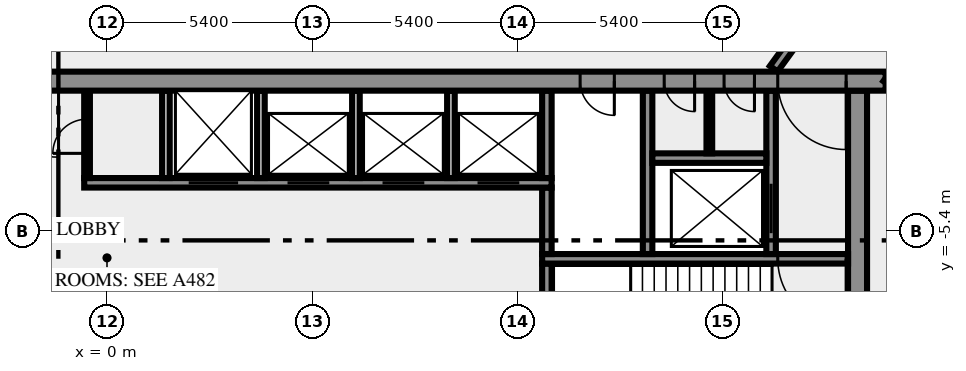
"""IFC4 building model, lengths in metres.
Left out: names, types, materials, properties, quantities, classifications, styles, units other than length and angle.
Written with IfcOpenShell. Run it as: python <this file> out.ifc"""

import sys

from ifc_helpers import new_model, si_unit, direction, frame, frame_2d, origin, place, context, subcontext, project, spatial, rectangle, extrude, element, fill, save


model = new_model("IFC4")
c1 = context("Model", 3, precision=1e-05, world=origin(), true_north=direction((0.0, 1.0)))
c2 = subcontext(c1, "Body", "Model", "MODEL_VIEW")
j1 = project(units=[si_unit("LENGTHUNIT", "METRE"), si_unit("PLANEANGLEUNIT", "RADIAN")], contexts=[c1])
p1 = place(None, origin())
s1 = spatial("IfcSite", under=j1, at=p1, CompositionType="ELEMENT")
p2 = place(p1, origin())
s2 = spatial("IfcBuilding", under=s1, at=p2, CompositionType="ELEMENT")
p3 = place(p2, frame((0.0, 0.0, 160.0)))
s3 = spatial("IfcBuildingStorey", under=s2, at=p3, CompositionType="ELEMENT", Elevation=160.0)
p4 = place(p3, frame((19.75, -10.5, 0.0), z_axis=(0.0, 0.0, 1.0), x_axis=(0.0, 1.0, 0.0)))
e1 = element("IfcWall", 1, at=p4, inside=s3, PredefinedType="SHEAR", context=c2, shape_type="SweptSolid", body=[
    extrude(rectangle(XDim=8.8, YDim=0.5, at=frame_2d((4.4, 0.0))), origin(), (0.0, 0.0, 1.0), 3.65),
])
p5 = place(p3, frame((11.575, -7.25, 0.0), z_axis=(0.0, 0.0, 1.0), x_axis=(0.0, 1.0, 0.0)))
e2 = element("IfcWall", 2, at=p5, inside=s3, PredefinedType="SHEAR", context=c2, shape_type="SweptSolid", body=[
    extrude(rectangle(XDim=1.0, YDim=0.25, at=frame_2d((0.5, 0.0))), origin(), (0.0, 0.0, 1.0), 3.65),
])
p6 = place(p3, frame((19.5, -6.125, 0.0), z_axis=(0.0, 0.0, 1.0), x_axis=(-1.0, 0.0, 0.0)))
e3 = element("IfcWall", 3, at=p6, inside=s3, PredefinedType="SHEAR", context=c2, shape_type="SweptSolid", body=[
    extrude(rectangle(XDim=8.05, YDim=0.25, at=frame_2d((4.025, 0.0))), origin(), (0.0, 0.0, 1.0), 3.65),
])
p7 = place(p6, frame((0.05, 0.0, 0.0)))
e4 = element("IfcOpeningElement", 4, at=p7, cuts=e3, PredefinedType="OPENING", context=c2, shape_type="SweptSolid", body=[
    extrude(rectangle(XDim=1.8, YDim=2.1, at=frame_2d((0.9, 1.05))), frame((0.0, 0.135, 0.0), z_axis=(0.0, -1.0, 0.0), x_axis=(1.0, 0.0, 0.0)), (0.0, 0.0, 1.0), 0.27),
])
p8 = place(p3, frame((11.575, -6.0, 0.0), z_axis=(0.0, 0.0, 1.0), x_axis=(0.0, 1.0, 0.0)))
e5 = element("IfcWall", 5, at=p8, inside=s3, PredefinedType="SHEAR", context=c2, shape_type="SweptSolid", body=[
    extrude(rectangle(XDim=1.75, YDim=0.25, at=frame_2d((0.875, 0.0))), origin(), (0.0, 0.0, 1.0), 3.65),
])
p9 = place(p3, frame((14.225, -6.0, 0.0), z_axis=(0.0, 0.0, 1.0), x_axis=(0.0, 1.0, 0.0)))
e6 = element("IfcWall", 6, at=p9, inside=s3, PredefinedType="SHEAR", context=c2, shape_type="SweptSolid", body=[
    extrude(rectangle(XDim=4.3, YDim=0.25, at=frame_2d((2.15, 0.0))), origin(), (0.0, 0.0, 1.0), 3.65),
])
p10 = place(p3, frame((17.475, -6.0, 0.0), z_axis=(0.0, 0.0, 1.0), x_axis=(0.0, 1.0, 0.0)))
e7 = element("IfcWall", 7, at=p10, inside=s3, PredefinedType="SHEAR", context=c2, shape_type="SweptSolid", body=[
    extrude(rectangle(XDim=4.3, YDim=0.25, at=frame_2d((2.15, 0.0))), origin(), (0.0, 0.0, 1.0), 3.65),
])
p11 = place(p10, frame((0.55, 0.0, 0.0)))
e8 = element("IfcOpeningElement", 8, at=p11, cuts=e7, PredefinedType="OPENING", context=c2, shape_type="SweptSolid", body=[
    extrude(rectangle(XDim=1.3, YDim=2.1, at=frame_2d((0.65, 1.05))), frame((0.0, 0.135, 0.0), z_axis=(0.0, -1.0, 0.0), x_axis=(1.0, 0.0, 0.0)), (0.0, 0.0, 1.0), 0.27),
])
p12 = place(p3, frame((-0.6, -4.125, 0.0), z_axis=(0.0, 0.0, 1.0), x_axis=(1.0, 0.0, 0.0)))
e9 = element("IfcWall", 9, at=p12, inside=s3, PredefinedType="SHEAR", context=c2, shape_type="SweptSolid", body=[
    extrude(rectangle(XDim=12.3, YDim=0.25, at=frame_2d((6.15, 0.0))), origin(), (0.0, 0.0, 1.0), 3.65),
])
p13 = place(p12, frame((2.75, 0.0, 0.0)))
e10 = element("IfcOpeningElement", 10, at=p13, cuts=e9, PredefinedType="OPENING", context=c2, shape_type="SweptSolid", body=[
    extrude(rectangle(XDim=1.3, YDim=2.1, at=frame_2d((0.65, 1.05))), frame((0.0, 0.135, 0.0), z_axis=(0.0, -1.0, 0.0), x_axis=(1.0, 0.0, 0.0)), (0.0, 0.0, 1.0), 0.27),
])
p14 = place(p12, frame((5.35, 0.0, 0.0)))
e11 = element("IfcOpeningElement", 11, at=p14, cuts=e9, PredefinedType="OPENING", context=c2, shape_type="SweptSolid", body=[
    extrude(rectangle(XDim=1.1, YDim=2.1, at=frame_2d((0.55, 1.05))), frame((0.0, 0.135, 0.0), z_axis=(0.0, -1.0, 0.0), x_axis=(1.0, 0.0, 0.0)), (0.0, 0.0, 1.0), 0.27),
])
p15 = place(p12, frame((7.85, 0.0, 0.0)))
e12 = element("IfcOpeningElement", 12, at=p15, cuts=e9, PredefinedType="OPENING", context=c2, shape_type="SweptSolid", body=[
    extrude(rectangle(XDim=1.1, YDim=2.1, at=frame_2d((0.55, 1.05))), frame((0.0, 0.135, 0.0), z_axis=(0.0, -1.0, 0.0), x_axis=(1.0, 0.0, 0.0)), (0.0, 0.0, 1.0), 0.27),
])
p16 = place(p12, frame((10.35, 0.0, 0.0)))
e13 = element("IfcOpeningElement", 13, at=p16, cuts=e9, PredefinedType="OPENING", context=c2, shape_type="SweptSolid", body=[
    extrude(rectangle(XDim=1.1, YDim=2.1, at=frame_2d((0.55, 1.05))), frame((0.0, 0.135, 0.0), z_axis=(0.0, -1.0, 0.0), x_axis=(1.0, 0.0, 0.0)), (0.0, 0.0, 1.0), 0.27),
])
p17 = place(p3, frame((-0.525, -4.0, 0.0), z_axis=(0.0, 0.0, 1.0), x_axis=(0.0, 1.0, 0.0)))
e14 = element("IfcWall", 14, at=p17, inside=s3, PredefinedType="PARTITIONING", context=c2, shape_type="SweptSolid", body=[
    extrude(rectangle(XDim=2.3, YDim=0.15, at=frame_2d((1.15, 0.0))), origin(), (0.0, 0.0, 1.0), 3.65),
])
p18 = place(p17, frame((0.65, 0.0, 0.0)))
e15 = element("IfcOpeningElement", 15, at=p18, cuts=e14, PredefinedType="OPENING", context=c2, shape_type="SweptSolid", body=[
    extrude(rectangle(XDim=0.9, YDim=2.1, at=frame_2d((0.45, 1.05))), frame((0.0, 0.085, 0.0), z_axis=(0.0, -1.0, 0.0), x_axis=(1.0, 0.0, 0.0)), (0.0, 0.0, 1.0), 0.17),
])
for number, where, z_axis, x_axis in (
    (16, (1.55, -4.0, 0.0), (0.0, 0.0, 1.0), (0.0, 1.0, 0.0)),
    (17, (4.05, -4.0, 0.0), (0.0, 0.0, 1.0), (0.0, 1.0, 0.0)),
    (18, (6.55, -4.0, 0.0), (0.0, 0.0, 1.0), (0.0, 1.0, 0.0)),
    (19, (9.05, -4.0, 0.0), (0.0, 0.0, 1.0), (0.0, 1.0, 0.0)),
):
    element("IfcWall", number, at=place(p3, frame(where, z_axis=z_axis, x_axis=x_axis)), inside=s3, PredefinedType="SOLIDWALL", context=c2, shape_type="SweptSolid", body=[
        extrude(rectangle(XDim=2.3, YDim=0.2, at=frame_2d((1.15, 0.0))), origin(), (0.0, 0.0, 1.0), 3.65),
    ])
p19 = place(p3, frame((11.575, -4.0, 0.0), z_axis=(0.0, 0.0, 1.0), x_axis=(0.0, 1.0, 0.0)))
e20 = element("IfcWall", 20, at=p19, inside=s3, PredefinedType="SHEAR", context=c2, shape_type="SweptSolid", body=[
    extrude(rectangle(XDim=2.3, YDim=0.25, at=frame_2d((1.15, 0.0))), origin(), (0.0, 0.0, 1.0), 3.65),
])
p20 = place(p3, frame((14.35, -3.475, 0.0), z_axis=(0.0, 0.0, 1.0), x_axis=(1.0, 0.0, 0.0)))
e21 = element("IfcWall", 21, at=p20, inside=s3, PredefinedType="SHEAR", context=c2, shape_type="SweptSolid", body=[
    extrude(rectangle(XDim=3.0, YDim=0.25, at=frame_2d((1.5, 0.0))), origin(), (0.0, 0.0, 1.0), 3.65),
])
p21 = place(p3, frame((15.85, -3.35, 0.0), z_axis=(0.0, 0.0, 1.0), x_axis=(0.0, 1.0, 0.0)))
e22 = element("IfcWall", 22, at=p21, inside=s3, PredefinedType="PARTITIONING", context=c2, shape_type="SweptSolid", body=[
    extrude(rectangle(XDim=1.65, YDim=0.15, at=frame_2d((0.825, 0.0))), origin(), (0.0, 0.0, 1.0), 3.65),
])
p22 = place(p3, frame((20.49, -1.45, 0.0), z_axis=(0.0, 0.0, 1.0), x_axis=(-1.0, 0.0, 0.0)))
e23 = element("IfcWall", 23, at=p22, inside=s3, PredefinedType="SHEAR", context=c2, shape_type="SweptSolid", body=[
    extrude(rectangle(XDim=40.98, YDim=0.5, at=frame_2d((20.49, 0.0))), origin(), (0.0, 0.0, 1.0), 3.65),
])
p23 = place(p22, frame((38.14, 0.0, 0.0)))
e24 = element("IfcOpeningElement", 24, at=p23, cuts=e23, PredefinedType="OPENING", context=c2, shape_type="SweptSolid", body=[
    extrude(rectangle(XDim=1.8, YDim=2.1, at=frame_2d((0.9, 1.05))), frame((0.0, 0.26, 0.0), z_axis=(0.0, -1.0, 0.0), x_axis=(1.0, 0.0, 0.0)), (0.0, 0.0, 1.0), 0.52),
])
p24 = place(p22, frame((35.89, 0.0, 0.0)))
e25 = element("IfcOpeningElement", 25, at=p24, cuts=e23, PredefinedType="OPENING", context=c2, shape_type="SweptSolid", body=[
    extrude(rectangle(XDim=0.9, YDim=2.1, at=frame_2d((0.45, 1.05))), frame((0.0, 0.26, 0.0), z_axis=(0.0, -1.0, 0.0), x_axis=(1.0, 0.0, 0.0)), (0.0, 0.0, 1.0), 0.52),
])
p25 = place(p22, frame((32.94, 0.0, 0.0)))
e26 = element("IfcOpeningElement", 26, at=p25, cuts=e23, PredefinedType="OPENING", context=c2, shape_type="SweptSolid", body=[
    extrude(rectangle(XDim=0.9, YDim=2.1, at=frame_2d((0.45, 1.05))), frame((0.0, 0.26, 0.0), z_axis=(0.0, -1.0, 0.0), x_axis=(1.0, 0.0, 0.0)), (0.0, 0.0, 1.0), 0.52),
])
p26 = place(p22, frame((28.802, 0.0, 0.0)))
e27 = element("IfcOpeningElement", 27, at=p26, cuts=e23, PredefinedType="OPENING", context=c2, shape_type="SweptSolid", body=[
    extrude(rectangle(XDim=0.9, YDim=2.1, at=frame_2d((0.45, 1.05))), frame((0.0, 0.26, 0.0), z_axis=(0.0, -1.0, 0.0), x_axis=(1.0, 0.0, 0.0)), (0.0, 0.0, 1.0), 0.52),
])
p27 = place(p22, frame((25.077, 0.0, 0.0)))
e28 = element("IfcOpeningElement", 28, at=p27, cuts=e23, PredefinedType="OPENING", context=c2, shape_type="SweptSolid", body=[
    extrude(rectangle(XDim=0.9, YDim=2.1, at=frame_2d((0.45, 1.05))), frame((0.0, 0.26, 0.0), z_axis=(0.0, -1.0, 0.0), x_axis=(1.0, 0.0, 0.0)), (0.0, 0.0, 1.0), 0.52),
])
p28 = place(p22, frame((21.765, 0.0, 0.0)))
e29 = element("IfcOpeningElement", 29, at=p28, cuts=e23, PredefinedType="OPENING", context=c2, shape_type="SweptSolid", body=[
    extrude(rectangle(XDim=2.0, YDim=2.1, at=frame_2d((1.0, 1.05))), frame((0.0, 0.26, 0.0), z_axis=(0.0, -1.0, 0.0), x_axis=(1.0, 0.0, 0.0)), (0.0, 0.0, 1.0), 0.52),
])
p29 = place(p22, frame((7.14, 0.0, 0.0)))
e30 = element("IfcOpeningElement", 30, at=p29, cuts=e23, PredefinedType="OPENING", context=c2, shape_type="SweptSolid", body=[
    extrude(rectangle(XDim=0.9, YDim=2.1, at=frame_2d((0.45, 1.05))), frame((0.0, 0.26, 0.0), z_axis=(0.0, -1.0, 0.0), x_axis=(1.0, 0.0, 0.0)), (0.0, 0.0, 1.0), 0.52),
])
p30 = place(p22, frame((5.028, 0.0, 0.0)))
e31 = element("IfcOpeningElement", 31, at=p30, cuts=e23, PredefinedType="OPENING", context=c2, shape_type="SweptSolid", body=[
    extrude(rectangle(XDim=0.8, YDim=2.1, at=frame_2d((0.4, 1.05))), frame((0.0, 0.26, 0.0), z_axis=(0.0, -1.0, 0.0), x_axis=(1.0, 0.0, 0.0)), (0.0, 0.0, 1.0), 0.52),
])
p31 = place(p22, frame((3.452, 0.0, 0.0)))
e32 = element("IfcOpeningElement", 32, at=p31, cuts=e23, PredefinedType="OPENING", context=c2, shape_type="SweptSolid", body=[
    extrude(rectangle(XDim=0.8, YDim=2.1, at=frame_2d((0.4, 1.05))), frame((0.0, 0.26, 0.0), z_axis=(0.0, -1.0, 0.0), x_axis=(1.0, 0.0, 0.0)), (0.0, 0.0, 1.0), 0.52),
])
p32 = place(p22, frame((1.04, 0.0, 0.0)))
e33 = element("IfcOpeningElement", 33, at=p32, cuts=e23, PredefinedType="OPENING", context=c2, shape_type="SweptSolid", body=[
    extrude(rectangle(XDim=1.8, YDim=2.1, at=frame_2d((0.9, 1.05))), frame((0.0, 0.26, 0.0), z_axis=(0.0, -1.0, 0.0), x_axis=(1.0, 0.0, 0.0)), (0.0, 0.0, 1.0), 0.52),
])
p33 = place(p3, frame((17.545, -1.125, 0.0), z_axis=(0.0, 0.0, 1.0), x_axis=(0.587786330937, 0.809016210693, 0.0)))
e34 = element("IfcWall", 34, at=p33, inside=s3, PredefinedType="SOLIDWALL", context=c2, shape_type="SweptSolid", body=[
    extrude(rectangle(XDim=30.103, YDim=0.25, at=frame_2d((15.052, 0.0))), origin(), (0.0, 0.0, 1.0), 3.65),
])
p34 = place(p33, frame((3.441, 0.0, 0.0)))
e35 = element("IfcOpeningElement", 35, at=p34, cuts=e34, PredefinedType="OPENING", context=c2, shape_type="SweptSolid", body=[
    extrude(rectangle(XDim=0.9, YDim=2.1, at=frame_2d((0.45, 1.05))), frame((0.0, 0.135, 0.0), z_axis=(0.0, -1.0, 0.0), x_axis=(1.0, 0.0, 0.0)), (0.0, 0.0, 1.0), 0.27),
])
p35 = place(p33, frame((28.729, 0.0, 0.0)))
e36 = element("IfcOpeningElement", 36, at=p35, cuts=e34, PredefinedType="OPENING", context=c2, shape_type="SweptSolid", body=[
    extrude(rectangle(XDim=0.9, YDim=2.1, at=frame_2d((0.45, 1.05))), frame((0.0, 0.135, 0.0), z_axis=(0.0, -1.0, 0.0), x_axis=(1.0, 0.0, 0.0)), (0.0, 0.0, 1.0), 0.27),
])
p36 = place(p3, frame((37.236, 21.469, 0.0), z_axis=(0.0, 0.0, 1.0), x_axis=(-0.58778344073, -0.809018310549, 0.0)))
e37 = element("IfcWall", 37, at=p36, inside=s3, PredefinedType="SOLIDWALL", context=c2, shape_type="SweptSolid", body=[
    extrude(rectangle(XDim=28.42, YDim=0.25, at=frame_2d((14.21, 0.0))), origin(), (0.0, 0.0, 1.0), 3.65),
])
p37 = place(p36, frame((14.554, 0.0, 0.0)))
e38 = element("IfcOpeningElement", 38, at=p37, cuts=e37, PredefinedType="OPENING", context=c2, shape_type="SweptSolid", body=[
    extrude(rectangle(XDim=0.9, YDim=2.1, at=frame_2d((0.45, 1.05))), frame((0.0, 0.135, 0.0), z_axis=(0.0, -1.0, 0.0), x_axis=(1.0, 0.0, 0.0)), (0.0, 0.0, 1.0), 0.27),
])
p38 = place(p36, frame((10.255, 0.0, 0.0)))
e39 = element("IfcOpeningElement", 39, at=p38, cuts=e37, PredefinedType="OPENING", context=c2, shape_type="SweptSolid", body=[
    extrude(rectangle(XDim=0.9, YDim=2.1, at=frame_2d((0.45, 1.05))), frame((0.0, 0.135, 0.0), z_axis=(0.0, -1.0, 0.0), x_axis=(1.0, 0.0, 0.0)), (0.0, 0.0, 1.0), 0.27),
])
p39 = place(p36, frame((11.854, 0.0, 0.0)))
e40 = element("IfcOpeningElement", 40, at=p39, cuts=e37, PredefinedType="OPENING", context=c2, shape_type="SweptSolid", body=[
    extrude(rectangle(XDim=0.9, YDim=2.1, at=frame_2d((0.45, 1.05))), frame((0.0, 0.135, 0.0), z_axis=(0.0, -1.0, 0.0), x_axis=(1.0, 0.0, 0.0)), (0.0, 0.0, 1.0), 0.27),
])
p40 = place(p7, origin())
e41 = element("IfcDoor", 41, at=p40, inside=s3, OperationType="DOUBLE_DOOR_SINGLE_SWING", PredefinedType="DOOR", context=c2, shape_type="SweptSolid", body=[
    extrude(rectangle(XDim=1.8, YDim=2.1, at=frame_2d((0.9, 1.05))), frame((0.0, 0.025, 0.0), z_axis=(0.0, -1.0, 0.0), x_axis=(1.0, 0.0, 0.0)), (0.0, 0.0, 1.0), 0.05),
])
fill(e4, e41)
p41 = place(p11, origin())
e42 = element("IfcDoor", 42, at=p41, inside=s3, OperationType="DOUBLE_DOOR_SLIDING", PredefinedType="DOOR", context=c2, shape_type="SweptSolid", body=[
    extrude(rectangle(XDim=1.3, YDim=2.1, at=frame_2d((0.65, 1.05))), frame((0.0, 0.025, 0.0), z_axis=(0.0, -1.0, 0.0), x_axis=(1.0, 0.0, 0.0)), (0.0, 0.0, 1.0), 0.05),
])
fill(e8, e42)
p42 = place(p13, origin())
e43 = element("IfcDoor", 43, at=p42, inside=s3, OperationType="DOUBLE_DOOR_SLIDING", PredefinedType="DOOR", context=c2, shape_type="SweptSolid", body=[
    extrude(rectangle(XDim=1.3, YDim=2.1, at=frame_2d((0.65, 1.05))), frame((0.0, 0.025, 0.0), z_axis=(0.0, -1.0, 0.0), x_axis=(1.0, 0.0, 0.0)), (0.0, 0.0, 1.0), 0.05),
])
fill(e10, e43)
p43 = place(p14, origin())
e44 = element("IfcDoor", 44, at=p43, inside=s3, OperationType="DOUBLE_DOOR_SLIDING", PredefinedType="DOOR", context=c2, shape_type="SweptSolid", body=[
    extrude(rectangle(XDim=1.1, YDim=2.1, at=frame_2d((0.55, 1.05))), frame((0.0, 0.025, 0.0), z_axis=(0.0, -1.0, 0.0), x_axis=(1.0, 0.0, 0.0)), (0.0, 0.0, 1.0), 0.05),
])
fill(e11, e44)
p44 = place(p15, origin())
e45 = element("IfcDoor", 45, at=p44, inside=s3, OperationType="DOUBLE_DOOR_SLIDING", PredefinedType="DOOR", context=c2, shape_type="SweptSolid", body=[
    extrude(rectangle(XDim=1.1, YDim=2.1, at=frame_2d((0.55, 1.05))), frame((0.0, 0.025, 0.0), z_axis=(0.0, -1.0, 0.0), x_axis=(1.0, 0.0, 0.0)), (0.0, 0.0, 1.0), 0.05),
])
fill(e12, e45)
p45 = place(p16, origin())
e46 = element("IfcDoor", 46, at=p45, inside=s3, OperationType="DOUBLE_DOOR_SLIDING", PredefinedType="DOOR", context=c2, shape_type="SweptSolid", body=[
    extrude(rectangle(XDim=1.1, YDim=2.1, at=frame_2d((0.55, 1.05))), frame((0.0, 0.025, 0.0), z_axis=(0.0, -1.0, 0.0), x_axis=(1.0, 0.0, 0.0)), (0.0, 0.0, 1.0), 0.05),
])
fill(e13, e46)
p46 = place(p18, origin())
e47 = element("IfcDoor", 47, at=p46, inside=s3, OperationType="SINGLE_SWING_LEFT", PredefinedType="DOOR", context=c2, shape_type="SweptSolid", body=[
    extrude(rectangle(XDim=0.9, YDim=2.1, at=frame_2d((0.45, 1.05))), frame((0.0, 0.025, 0.0), z_axis=(0.0, -1.0, 0.0), x_axis=(1.0, 0.0, 0.0)), (0.0, 0.0, 1.0), 0.05),
])
fill(e15, e47)
p47 = place(p28, origin())
e48 = element("IfcDoor", 48, at=p47, inside=s3, OperationType="DOUBLE_DOOR_SINGLE_SWING", PredefinedType="DOOR", context=c2, shape_type="SweptSolid", body=[
    extrude(rectangle(XDim=2.0, YDim=2.1, at=frame_2d((1.0, 1.05))), frame((0.0, 0.025, 0.0), z_axis=(0.0, -1.0, 0.0), x_axis=(1.0, 0.0, 0.0)), (0.0, 0.0, 1.0), 0.05),
])
fill(e29, e48)
p48 = place(p29, origin())
e49 = element("IfcDoor", 49, at=p48, inside=s3, OperationType="SINGLE_SWING_LEFT", PredefinedType="DOOR", context=c2, shape_type="SweptSolid", body=[
    extrude(rectangle(XDim=0.9, YDim=2.1, at=frame_2d((0.45, 1.05))), frame((0.0, 0.025, 0.0), z_axis=(0.0, -1.0, 0.0), x_axis=(1.0, 0.0, 0.0)), (0.0, 0.0, 1.0), 0.05),
])
fill(e30, e49)
p49 = place(p30, origin())
e50 = element("IfcDoor", 50, at=p49, inside=s3, OperationType="SINGLE_SWING_LEFT", PredefinedType="DOOR", context=c2, shape_type="SweptSolid", body=[
    extrude(rectangle(XDim=0.8, YDim=2.1, at=frame_2d((0.4, 1.05))), frame((0.0, 0.025, 0.0), z_axis=(0.0, -1.0, 0.0), x_axis=(1.0, 0.0, 0.0)), (0.0, 0.0, 1.0), 0.05),
])
fill(e31, e50)
p50 = place(p31, origin())
e51 = element("IfcDoor", 51, at=p50, inside=s3, OperationType="SINGLE_SWING_LEFT", PredefinedType="DOOR", context=c2, shape_type="SweptSolid", body=[
    extrude(rectangle(XDim=0.8, YDim=2.1, at=frame_2d((0.4, 1.05))), frame((0.0, 0.025, 0.0), z_axis=(0.0, -1.0, 0.0), x_axis=(1.0, 0.0, 0.0)), (0.0, 0.0, 1.0), 0.05),
])
fill(e32, e51)
p51 = place(p32, origin())
e52 = element("IfcDoor", 52, at=p51, inside=s3, OperationType="DOUBLE_DOOR_SINGLE_SWING", PredefinedType="DOOR", context=c2, shape_type="SweptSolid", body=[
    extrude(rectangle(XDim=1.8, YDim=2.1, at=frame_2d((0.9, 1.05))), frame((0.0, 0.025, 0.0), z_axis=(0.0, -1.0, 0.0), x_axis=(1.0, 0.0, 0.0)), (0.0, 0.0, 1.0), 0.05),
])
fill(e33, e52)
save(model, sys.argv[1])
